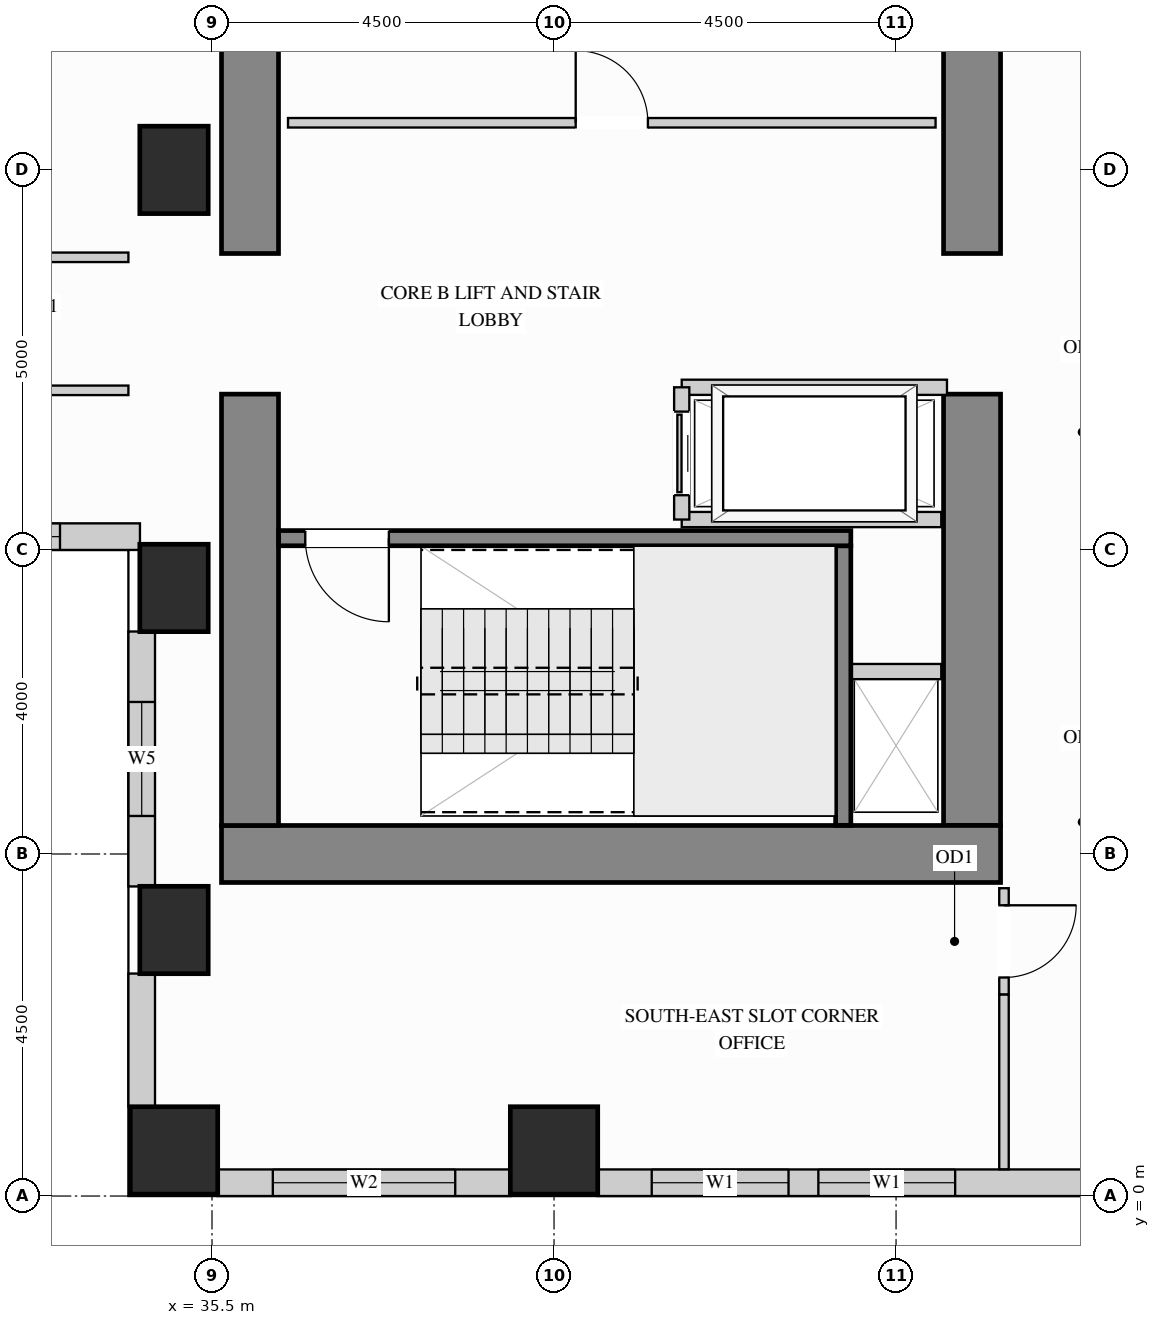
"""IFC4 building model, lengths in metres.
Left out: names, types, materials, properties, quantities, classifications, styles, units other than length and angle.
Written with IfcOpenShell. Run it as: python <this file> out.ifc"""

import sys

from ifc_helpers import new_model, si_unit, direction, frame, frame_2d, origin, origin_2d, place, context, subcontext, project, spatial, rectangle, extrude, source, transform, mapped, element, fill, save


model = new_model("IFC4")
c1 = context("Model", 3, precision=1e-05, world=origin(), true_north=direction((0.0, 1.0)))
c2 = subcontext(c1, "Body", "Model", "MODEL_VIEW")
j1 = project(units=[si_unit("LENGTHUNIT", "METRE"), si_unit("PLANEANGLEUNIT", "RADIAN")], contexts=[c1])
p1 = place(None, origin())
s1 = spatial("IfcSite", under=j1, at=p1, CompositionType="ELEMENT")
p2 = place(p1, origin())
s2 = spatial("IfcBuilding", under=s1, at=p2, CompositionType="ELEMENT")
p3 = place(p2, frame((0.0, 0.0, 113.4)))
s3 = spatial("IfcBuildingStorey", under=s2, at=p3, CompositionType="ELEMENT", Elevation=113.4)
m1 = source(origin(), c2, "Body", "SweptSolid", [
    extrude(rectangle(XDim=0.9, YDim=1.15, at=origin_2d()), origin(), (0.0, 0.0, 1.0), 3.38),
])
for number, where, z_axis, x_axis in (
    (1, (35.0, 13.5, 0.0), (0.0, 0.0, 1.0), (1.0, 0.0, 0.0)),
    (2, (35.0, 3.5, 0.0), (0.0, 0.0, 1.0), (1.0, 0.0, 0.0)),
    (3, (35.0, 8.0, 0.0), (0.0, 0.0, 1.0), (1.0, 0.0, 0.0)),
):
    element("IfcColumn", number, at=place(p3, frame(where, z_axis=z_axis, x_axis=x_axis)), inside=s3, PredefinedType="COLUMN", context=c2, shape_type="MappedRepresentation", body=[
        mapped(m1, transform((0.0, 0.0, 0.0), x_axis=(1.0, 0.0, 0.0), y_axis=(0.0, 1.0, 0.0), z_axis=(0.0, 0.0, 1.0))),
    ])
m2 = source(origin(), c2, "Body", "SweptSolid", [
    extrude(rectangle(XDim=1.15, YDim=1.15, at=origin_2d()), origin(), (0.0, 0.0, 1.0), 3.38),
])
for number, where, z_axis, x_axis in (
    (4, (35.0, 0.6, 0.0), (0.0, 0.0, 1.0), (1.0, 0.0, 0.0)),
    (5, (40.0, 0.6, 0.0), (0.0, 0.0, 1.0), (1.0, 0.0, 0.0)),
):
    element("IfcColumn", number, at=place(p3, frame(where, z_axis=z_axis, x_axis=x_axis)), inside=s3, PredefinedType="COLUMN", context=c2, shape_type="MappedRepresentation", body=[
        mapped(m2, transform((0.0, 0.0, 0.0), x_axis=(1.0, 0.0, 0.0), y_axis=(0.0, 1.0, 0.0), z_axis=(0.0, 0.0, 1.0))),
    ])
m3 = source(origin(), c2, "Body", "SweptSolid", [
    extrude(rectangle(XDim=5.675, YDim=0.75, at=frame_2d((2.837, 0.0))), origin(), (0.0, 0.0, 1.0), 3.38),
])
p4 = place(p3, frame((45.5, 4.875, 0.0), z_axis=(0.0, 0.0, 1.0), x_axis=(0.0, 1.0, 0.0)))
e6 = element("IfcWall", 6, at=p4, inside=s3, PredefinedType="SHEAR", context=c2, shape_type="MappedRepresentation", body=[
    mapped(m3, transform((0.0, 0.0, 0.0), x_axis=(1.0, 0.0, 0.0), y_axis=(0.0, 1.0, 0.0), z_axis=(0.0, 0.0, 1.0))),
])
m4 = source(origin(), c2, "Body", "SweptSolid", [
    extrude(rectangle(XDim=3.725, YDim=0.75, at=frame_2d((1.863, 0.0))), origin(), (0.0, 0.0, 1.0), 3.38),
])
p5 = place(p3, frame((45.5, 12.4, 0.0), z_axis=(0.0, 0.0, 1.0), x_axis=(0.0, 1.0, 0.0)))
e7 = element("IfcWall", 7, at=p5, inside=s3, PredefinedType="SHEAR", context=c2, shape_type="MappedRepresentation", body=[
    mapped(m4, transform((0.0, 0.0, 0.0), x_axis=(1.0, 0.0, 0.0), y_axis=(0.0, 1.0, 0.0), z_axis=(0.0, 0.0, 1.0))),
])
m5 = source(origin(), c2, "Body", "SweptSolid", [
    extrude(rectangle(XDim=10.25, YDim=0.75, at=frame_2d((5.125, 0.0))), origin(), (0.0, 0.0, 1.0), 3.38),
])
p6 = place(p3, frame((35.625, 4.5, 0.0), z_axis=(0.0, 0.0, 1.0), x_axis=(1.0, 0.0, 0.0)))
e8 = element("IfcWall", 8, at=p6, inside=s3, PredefinedType="SHEAR", context=c2, shape_type="MappedRepresentation", body=[
    mapped(m5, transform((0.0, 0.0, 0.0), x_axis=(1.0, 0.0, 0.0), y_axis=(0.0, 1.0, 0.0), z_axis=(0.0, 0.0, 1.0))),
])
p7 = place(p3, frame((36.0, 4.875, 0.0), z_axis=(0.0, 0.0, 1.0), x_axis=(0.0, 1.0, 0.0)))
e9 = element("IfcWall", 9, at=p7, inside=s3, PredefinedType="SHEAR", context=c2, shape_type="MappedRepresentation", body=[
    mapped(m3, transform((0.0, 0.0, 0.0), x_axis=(1.0, 0.0, 0.0), y_axis=(0.0, 1.0, 0.0), z_axis=(0.0, 0.0, 1.0))),
])
p8 = place(p3, frame((36.0, 12.4, 0.0), z_axis=(0.0, 0.0, 1.0), x_axis=(0.0, 1.0, 0.0)))
e10 = element("IfcWall", 10, at=p8, inside=s3, PredefinedType="SHEAR", context=c2, shape_type="MappedRepresentation", body=[
    mapped(m4, transform((0.0, 0.0, 0.0), x_axis=(1.0, 0.0, 0.0), y_axis=(0.0, 1.0, 0.0), z_axis=(0.0, 0.0, 1.0))),
])
p9 = place(p3, frame((30.948, 8.675, 0.0), z_axis=(0.0, 0.0, 1.0), x_axis=(1.0, 0.0, 0.0)))
e11 = element("IfcWall", 11, at=p9, inside=s3, PredefinedType="SOLIDWALL", context=c2, shape_type="SweptSolid", body=[
    extrude(rectangle(XDim=3.604, YDim=0.35, at=frame_2d((1.802, 0.0))), origin(), (0.0, 0.0, 1.0), 3.365),
])
p10 = place(p9, frame((1.052, 0.0, 0.78)))
e12 = element("IfcOpeningElement", 12, at=p10, cuts=e11, PredefinedType="OPENING", context=c2, shape_type="SweptSolid", body=[
    extrude(rectangle(XDim=1.5, YDim=2.0, at=frame_2d((0.75, 1.0))), frame((0.0, 0.185, 0.0), z_axis=(0.0, -1.0, 0.0), x_axis=(1.0, 0.0, 0.0)), (0.0, 0.0, 1.0), 0.37),
])
p11 = place(p3, frame((34.575, 7.427, 0.0), z_axis=(0.0, 0.0, 1.0), x_axis=(0.0, -1.0, 0.0)))
e13 = element("IfcWall", 13, at=p11, inside=s3, PredefinedType="SOLIDWALL", context=c2, shape_type="SweptSolid", body=[
    extrude(rectangle(XDim=3.354, YDim=0.35, at=frame_2d((1.677, 0.0))), origin(), (0.0, 0.0, 1.0), 3.365),
])
p12 = place(p11, frame((0.927, 0.0, 0.78)))
e14 = element("IfcOpeningElement", 14, at=p12, cuts=e13, PredefinedType="OPENING", context=c2, shape_type="SweptSolid", body=[
    extrude(rectangle(XDim=1.5, YDim=2.0, at=frame_2d((0.75, 1.0))), frame((0.0, 0.185, 0.0), z_axis=(0.0, -1.0, 0.0), x_axis=(1.0, 0.0, 0.0)), (0.0, 0.0, 1.0), 0.37),
])
m6 = source(origin(), c2, "Body", "SweptSolid", [
    extrude(rectangle(XDim=1.754, YDim=0.35, at=frame_2d((0.877, 0.0))), origin(), (0.0, 0.0, 1.0), 3.365),
])
p13 = place(p3, frame((34.575, 2.927, 0.0), z_axis=(0.0, 0.0, 1.0), x_axis=(0.0, -1.0, 0.0)))
e15 = element("IfcWall", 15, at=p13, inside=s3, PredefinedType="SOLIDWALL", context=c2, shape_type="MappedRepresentation", body=[
    mapped(m6, transform((0.0, 0.0, 0.0), x_axis=(1.0, 0.0, 0.0), y_axis=(0.0, 1.0, 0.0), z_axis=(0.0, 0.0, 1.0))),
])
p14 = place(p3, frame((35.573, 0.175, 0.0), z_axis=(0.0, 0.0, 1.0), x_axis=(1.0, 0.0, 0.0)))
e16 = element("IfcWall", 16, at=p14, inside=s3, PredefinedType="SOLIDWALL", context=c2, shape_type="SweptSolid", body=[
    extrude(rectangle(XDim=3.854, YDim=0.35, at=frame_2d((1.927, 0.0))), origin(), (0.0, 0.0, 1.0), 3.365),
])
p15 = place(p14, frame((0.727, 0.0, 0.78)))
e17 = element("IfcOpeningElement", 17, at=p15, cuts=e16, PredefinedType="OPENING", context=c2, shape_type="SweptSolid", body=[
    extrude(rectangle(XDim=2.4, YDim=2.1, at=frame_2d((1.2, 1.05))), frame((0.0, 0.185, 0.0), z_axis=(0.0, -1.0, 0.0), x_axis=(1.0, 0.0, 0.0)), (0.0, 0.0, 1.0), 0.37),
])
p16 = place(p3, frame((40.573, 0.175, 0.0), z_axis=(0.0, 0.0, 1.0), x_axis=(1.0, 0.0, 0.0)))
e18 = element("IfcWall", 18, at=p16, inside=s3, PredefinedType="SOLIDWALL", context=c2, shape_type="SweptSolid", body=[
    extrude(rectangle(XDim=6.454, YDim=0.35, at=frame_2d((3.227, 0.0))), origin(), (0.0, 0.0, 1.0), 3.365),
])
p17 = place(p16, frame((0.712, 0.0, 0.78)))
e19 = element("IfcOpeningElement", 19, at=p17, cuts=e18, PredefinedType="OPENING", context=c2, shape_type="SweptSolid", body=[
    extrude(rectangle(XDim=1.8, YDim=2.1, at=frame_2d((0.9, 1.05))), frame((0.0, 0.185, 0.0), z_axis=(0.0, -1.0, 0.0), x_axis=(1.0, 0.0, 0.0)), (0.0, 0.0, 1.0), 0.37),
])
p18 = place(p16, frame((2.905, 0.0, 0.78)))
e20 = element("IfcOpeningElement", 20, at=p18, cuts=e18, PredefinedType="OPENING", context=c2, shape_type="SweptSolid", body=[
    extrude(rectangle(XDim=1.8, YDim=2.1, at=frame_2d((0.9, 1.05))), frame((0.0, 0.185, 0.0), z_axis=(0.0, -1.0, 0.0), x_axis=(1.0, 0.0, 0.0)), (0.0, 0.0, 1.0), 0.37),
])
p19 = place(p3, frame((36.5, 14.12, 0.0), z_axis=(0.0, 0.0, 1.0), x_axis=(1.0, 0.0, 0.0)))
e21 = element("IfcWall", 21, at=p19, inside=s3, PredefinedType="PARTITIONING", context=c2, shape_type="SweptSolid", body=[
    extrude(rectangle(XDim=8.52, YDim=0.125, at=frame_2d((4.26, 0.0))), origin(), (0.0, 0.0, 1.0), 3.365),
])
p20 = place(p19, frame((3.785, 0.0, 0.0)))
e22 = element("IfcOpeningElement", 22, at=p20, cuts=e21, PredefinedType="OPENING", context=c2, shape_type="SweptSolid", body=[
    extrude(rectangle(XDim=0.95, YDim=2.15, at=frame_2d((0.475, 1.075))), frame((0.0, 0.073, 0.0), z_axis=(0.0, -1.0, 0.0), x_axis=(1.0, 0.0, 0.0)), (0.0, 0.0, 1.0), 0.145),
])
p21 = place(p3, frame((45.92, 2.65, 0.0), z_axis=(0.0, 0.0, 1.0), x_axis=(0.0, 1.0, 0.0)))
e23 = element("IfcWall", 23, at=p21, inside=s3, PredefinedType="PARTITIONING", context=c2, shape_type="SweptSolid", body=[
    extrude(rectangle(XDim=1.4, YDim=0.125, at=frame_2d((0.7, 0.0))), origin(), (0.0, 0.0, 1.0), 3.365),
])
p22 = place(p21, frame((0.225, 0.0, 0.0)))
e24 = element("IfcOpeningElement", 24, at=p22, cuts=e23, PredefinedType="OPENING", context=c2, shape_type="SweptSolid", body=[
    extrude(rectangle(XDim=0.95, YDim=2.15, at=frame_2d((0.475, 1.075))), frame((0.0, 0.073, 0.0), z_axis=(0.0, -1.0, 0.0), x_axis=(1.0, 0.0, 0.0)), (0.0, 0.0, 1.0), 0.145),
])
m7 = source(origin(), c2, "Body", "SweptSolid", [
    extrude(rectangle(XDim=2.298, YDim=0.125, at=frame_2d((1.149, 0.0))), origin(), (0.0, 0.0, 1.0), 3.365),
])
p23 = place(p3, frame((45.92, 0.352, 0.0), z_axis=(0.0, 0.0, 1.0), x_axis=(0.0, 1.0, 0.0)))
e25 = element("IfcWall", 25, at=p23, inside=s3, PredefinedType="PARTITIONING", context=c2, shape_type="MappedRepresentation", body=[
    mapped(m7, transform((0.0, 0.0, 0.0), x_axis=(1.0, 0.0, 0.0), y_axis=(0.0, 1.0, 0.0), z_axis=(0.0, 0.0, 1.0))),
])
p24 = place(p3, frame((29.85, 12.35, 0.0), z_axis=(0.0, 0.0, 1.0), x_axis=(1.0, 0.0, 0.0)))
e26 = element("IfcWall", 26, at=p24, inside=s3, PredefinedType="PARTITIONING", context=c2, shape_type="SweptSolid", body=[
    extrude(rectangle(XDim=4.55, YDim=0.125, at=frame_2d((2.275, 0.0))), origin(), (0.0, 0.0, 1.0), 3.365),
])
p25 = place(p24, frame((1.8, 0.0, 0.0)))
e27 = element("IfcOpeningElement", 27, at=p25, cuts=e26, PredefinedType="OPENING", context=c2, shape_type="SweptSolid", body=[
    extrude(rectangle(XDim=0.95, YDim=2.15, at=frame_2d((0.475, 1.075))), frame((0.0, 0.073, 0.0), z_axis=(0.0, -1.0, 0.0), x_axis=(1.0, 0.0, 0.0)), (0.0, 0.0, 1.0), 0.145),
])
p26 = place(p3, frame((29.85, 10.6, 0.0), z_axis=(0.0, 0.0, 1.0), x_axis=(1.0, 0.0, 0.0)))
e28 = element("IfcWall", 28, at=p26, inside=s3, PredefinedType="PARTITIONING", context=c2, shape_type="SweptSolid", body=[
    extrude(rectangle(XDim=4.55, YDim=0.125, at=frame_2d((2.275, 0.0))), origin(), (0.0, 0.0, 1.0), 3.365),
])
p27 = place(p26, frame((1.8, 0.0, 0.0)))
e29 = element("IfcOpeningElement", 29, at=p27, cuts=e28, PredefinedType="OPENING", context=c2, shape_type="SweptSolid", body=[
    extrude(rectangle(XDim=0.95, YDim=2.15, at=frame_2d((0.475, 1.075))), frame((0.0, 0.073, 0.0), z_axis=(0.0, -1.0, 0.0), x_axis=(1.0, 0.0, 0.0)), (0.0, 0.0, 1.0), 0.145),
])
m8 = source(origin(), c2, "Body", "SweptSolid", [
    extrude(rectangle(XDim=1.245, YDim=0.2, at=frame_2d((0.623, 0.0))), origin(), (0.0, 0.0, 1.0), 3.365),
])
p28 = place(p3, frame((43.85, 6.9, 0.0), z_axis=(0.0, 0.0, 1.0), x_axis=(1.0, 0.0, 0.0)))
e30 = element("IfcWall", 30, at=p28, inside=s3, PredefinedType="PARTITIONING", context=c2, shape_type="MappedRepresentation", body=[
    mapped(m8, transform((0.0, 0.0, 0.0), x_axis=(1.0, 0.0, 0.0), y_axis=(0.0, 1.0, 0.0), z_axis=(0.0, 0.0, 1.0))),
])
m9 = source(origin(), c2, "Body", "SweptSolid", [
    extrude(rectangle(XDim=3.49, YDim=0.2, at=frame_2d((1.745, 0.0))), origin(), (0.0, 0.0, 1.0), 3.365),
])
p29 = place(p3, frame((41.68, 10.64, 0.0), z_axis=(0.0, 0.0, 1.0), x_axis=(1.0, 0.0, 0.0)))
e31 = element("IfcWall", 31, at=p29, inside=s3, PredefinedType="PARTITIONING", context=c2, shape_type="MappedRepresentation", body=[
    mapped(m9, transform((0.0, 0.0, 0.0), x_axis=(1.0, 0.0, 0.0), y_axis=(0.0, 1.0, 0.0), z_axis=(0.0, 0.0, 1.0))),
])
m10 = source(origin(), c2, "Body", "SweptSolid", [
    extrude(rectangle(XDim=3.415, YDim=0.2, at=frame_2d((1.708, 0.0))), origin(), (0.0, 0.0, 1.0), 3.365),
])
p30 = place(p3, frame((41.68, 8.9, 0.0), z_axis=(0.0, 0.0, 1.0), x_axis=(1.0, 0.0, 0.0)))
e32 = element("IfcWall", 32, at=p30, inside=s3, PredefinedType="PARTITIONING", context=c2, shape_type="MappedRepresentation", body=[
    mapped(m10, transform((0.0, 0.0, 0.0), x_axis=(1.0, 0.0, 0.0), y_axis=(0.0, 1.0, 0.0), z_axis=(0.0, 0.0, 1.0))),
])
p31 = place(p3, frame((41.68, 8.9, 0.0), z_axis=(0.0, 0.0, 1.0), x_axis=(0.0, 1.0, 0.0)))
e33 = element("IfcWall", 33, at=p31, inside=s3, PredefinedType="PARTITIONING", context=c2, shape_type="SweptSolid", body=[
    extrude(rectangle(XDim=1.74, YDim=0.2, at=frame_2d((0.87, 0.0))), origin(), (0.0, 0.0, 1.0), 3.365),
])
p32 = place(p31, frame((0.32, 0.0, 0.0)))
e34 = element("IfcOpeningElement", 34, at=p32, cuts=e33, PredefinedType="OPENING", context=c2, shape_type="SweptSolid", body=[
    extrude(rectangle(XDim=1.1, YDim=2.2, at=frame_2d((0.55, 1.1))), frame((0.0, 0.11, 0.0), z_axis=(0.0, -1.0, 0.0), x_axis=(1.0, 0.0, 0.0)), (0.0, 0.0, 1.0), 0.22),
])
m11 = source(origin(), c2, "Body", "SweptSolid", [
    extrude(rectangle(XDim=3.678, YDim=0.2, at=frame_2d((1.839, 0.0))), origin(), (0.0, 0.0, 1.0), 3.38),
])
p33 = place(p3, frame((43.805, 4.877, 0.0), z_axis=(0.0, 0.0, 1.0), x_axis=(0.0, 1.0, 0.0)))
e35 = element("IfcWall", 35, at=p33, inside=s3, PredefinedType="SHEAR", context=c2, shape_type="MappedRepresentation", body=[
    mapped(m11, transform((0.0, 0.0, 0.0), x_axis=(1.0, 0.0, 0.0), y_axis=(0.0, 1.0, 0.0), z_axis=(0.0, 0.0, 1.0))),
])
p34 = place(p3, frame((36.377, 8.655, 0.0), z_axis=(0.0, 0.0, 1.0), x_axis=(1.0, 0.0, 0.0)))
e36 = element("IfcWall", 36, at=p34, inside=s3, PredefinedType="SHEAR", context=c2, shape_type="SweptSolid", body=[
    extrude(rectangle(XDim=7.528, YDim=0.2, at=frame_2d((3.764, 0.0))), origin(), (0.0, 0.0, 1.0), 3.38),
])
p35 = place(p34, frame((0.35, 0.0, 0.0)))
e37 = element("IfcOpeningElement", 37, at=p35, cuts=e36, PredefinedType="OPENING", context=c2, shape_type="SweptSolid", body=[
    extrude(rectangle(XDim=1.1, YDim=2.15, at=frame_2d((0.55, 1.075))), frame((0.0, 0.11, 0.0), z_axis=(0.0, -1.0, 0.0), x_axis=(1.0, 0.0, 0.0)), (0.0, 0.0, 1.0), 0.22),
])
m12 = source(origin(), c2, "Body", "SweptSolid", [
    extrude(rectangle(XDim=1.1, YDim=2.2, at=frame_2d((0.55, 1.1))), frame((0.0, 0.025, 0.0), z_axis=(0.0, -1.0, 0.0), x_axis=(1.0, 0.0, 0.0)), (0.0, 0.0, 1.0), 0.05),
])
p36 = place(p32, origin())
e38 = element("IfcDoor", 38, at=p36, inside=s3, OperationType="SLIDING_TO_LEFT", PredefinedType="DOOR", context=c2, shape_type="MappedRepresentation", body=[
    mapped(m12, transform((0.0, 0.0, 0.0), x_axis=(1.0, 0.0, 0.0), y_axis=(0.0, 1.0, 0.0), z_axis=(0.0, 0.0, 1.0))),
])
fill(e34, e38)
m13 = source(origin(), c2, "Body", "SweptSolid", [
    extrude(rectangle(XDim=0.95, YDim=2.15, at=frame_2d((0.475, 1.075))), frame((0.0, 0.025, 0.0), z_axis=(0.0, -1.0, 0.0), x_axis=(1.0, 0.0, 0.0)), (0.0, 0.0, 1.0), 0.05),
])
p37 = place(p20, origin())
e39 = element("IfcDoor", 39, at=p37, inside=s3, OperationType="SINGLE_SWING_LEFT", PredefinedType="DOOR", context=c2, shape_type="MappedRepresentation", body=[
    mapped(m13, transform((0.0, 0.0, 0.0), x_axis=(1.0, 0.0, 0.0), y_axis=(0.0, 1.0, 0.0), z_axis=(0.0, 0.0, 1.0))),
])
fill(e22, e39)
p38 = place(p22, origin())
e40 = element("IfcDoor", 40, at=p38, inside=s3, OperationType="SINGLE_SWING_RIGHT", PredefinedType="DOOR", context=c2, shape_type="MappedRepresentation", body=[
    mapped(m13, transform((0.0, 0.0, 0.0), x_axis=(1.0, 0.0, 0.0), y_axis=(0.0, 1.0, 0.0), z_axis=(0.0, 0.0, 1.0))),
])
fill(e24, e40)
m14 = source(origin(), c2, "Body", "SweptSolid", [
    extrude(rectangle(XDim=1.1, YDim=2.15, at=frame_2d((0.55, 1.075))), frame((0.0, 0.025, 0.0), z_axis=(0.0, -1.0, 0.0), x_axis=(1.0, 0.0, 0.0)), (0.0, 0.0, 1.0), 0.05),
])
p39 = place(p35, origin())
e41 = element("IfcDoor", 41, at=p39, inside=s3, OperationType="SINGLE_SWING_RIGHT", PredefinedType="DOOR", context=c2, shape_type="MappedRepresentation", body=[
    mapped(m14, transform((0.0, 0.0, 0.0), x_axis=(1.0, 0.0, 0.0), y_axis=(0.0, 1.0, 0.0), z_axis=(0.0, 0.0, 1.0))),
])
fill(e37, e41)
m15 = source(origin(), c2, "Body", "SweptSolid", [
    extrude(rectangle(XDim=1.8, YDim=2.1, at=frame_2d((0.9, 1.05))), frame((0.0, 0.03, 0.0), z_axis=(0.0, -1.0, 0.0), x_axis=(1.0, 0.0, 0.0)), (0.0, 0.0, 1.0), 0.06),
])
p40 = place(p17, origin())
e42 = element("IfcWindow", 42, at=p40, inside=s3, PartitioningType="SINGLE_PANEL", PredefinedType="WINDOW", context=c2, shape_type="MappedRepresentation", body=[
    mapped(m15, transform((0.0, 0.0, 0.0), x_axis=(1.0, 0.0, 0.0), y_axis=(0.0, 1.0, 0.0), z_axis=(0.0, 0.0, 1.0))),
])
fill(e19, e42)
p41 = place(p18, origin())
e43 = element("IfcWindow", 43, at=p41, inside=s3, PartitioningType="SINGLE_PANEL", PredefinedType="WINDOW", context=c2, shape_type="MappedRepresentation", body=[
    mapped(m15, transform((0.0, 0.0, 0.0), x_axis=(1.0, 0.0, 0.0), y_axis=(0.0, 1.0, 0.0), z_axis=(0.0, 0.0, 1.0))),
])
fill(e20, e43)
m16 = source(origin(), c2, "Body", "SweptSolid", [
    extrude(rectangle(XDim=2.4, YDim=2.1, at=frame_2d((1.2, 1.05))), frame((0.0, 0.03, 0.0), z_axis=(0.0, -1.0, 0.0), x_axis=(1.0, 0.0, 0.0)), (0.0, 0.0, 1.0), 0.06),
])
p42 = place(p15, origin())
e44 = element("IfcWindow", 44, at=p42, inside=s3, PartitioningType="SINGLE_PANEL", PredefinedType="WINDOW", context=c2, shape_type="MappedRepresentation", body=[
    mapped(m16, transform((0.0, 0.0, 0.0), x_axis=(1.0, 0.0, 0.0), y_axis=(0.0, 1.0, 0.0), z_axis=(0.0, 0.0, 1.0))),
])
fill(e17, e44)
m17 = source(origin(), c2, "Body", "SweptSolid", [
    extrude(rectangle(XDim=1.5, YDim=2.0, at=frame_2d((0.75, 1.0))), frame((0.0, 0.03, 0.0), z_axis=(0.0, -1.0, 0.0), x_axis=(1.0, 0.0, 0.0)), (0.0, 0.0, 1.0), 0.06),
])
p43 = place(p10, origin())
e45 = element("IfcWindow", 45, at=p43, inside=s3, PartitioningType="SINGLE_PANEL", PredefinedType="WINDOW", context=c2, shape_type="MappedRepresentation", body=[
    mapped(m17, transform((0.0, 0.0, 0.0), x_axis=(1.0, 0.0, 0.0), y_axis=(0.0, 1.0, 0.0), z_axis=(0.0, 0.0, 1.0))),
])
fill(e12, e45)
p44 = place(p12, origin())
e46 = element("IfcWindow", 46, at=p44, inside=s3, PartitioningType="SINGLE_PANEL", PredefinedType="WINDOW", context=c2, shape_type="MappedRepresentation", body=[
    mapped(m17, transform((0.0, 0.0, 0.0), x_axis=(1.0, 0.0, 0.0), y_axis=(0.0, 1.0, 0.0), z_axis=(0.0, 0.0, 1.0))),
])
fill(e14, e46)
save(model, sys.argv[1])
